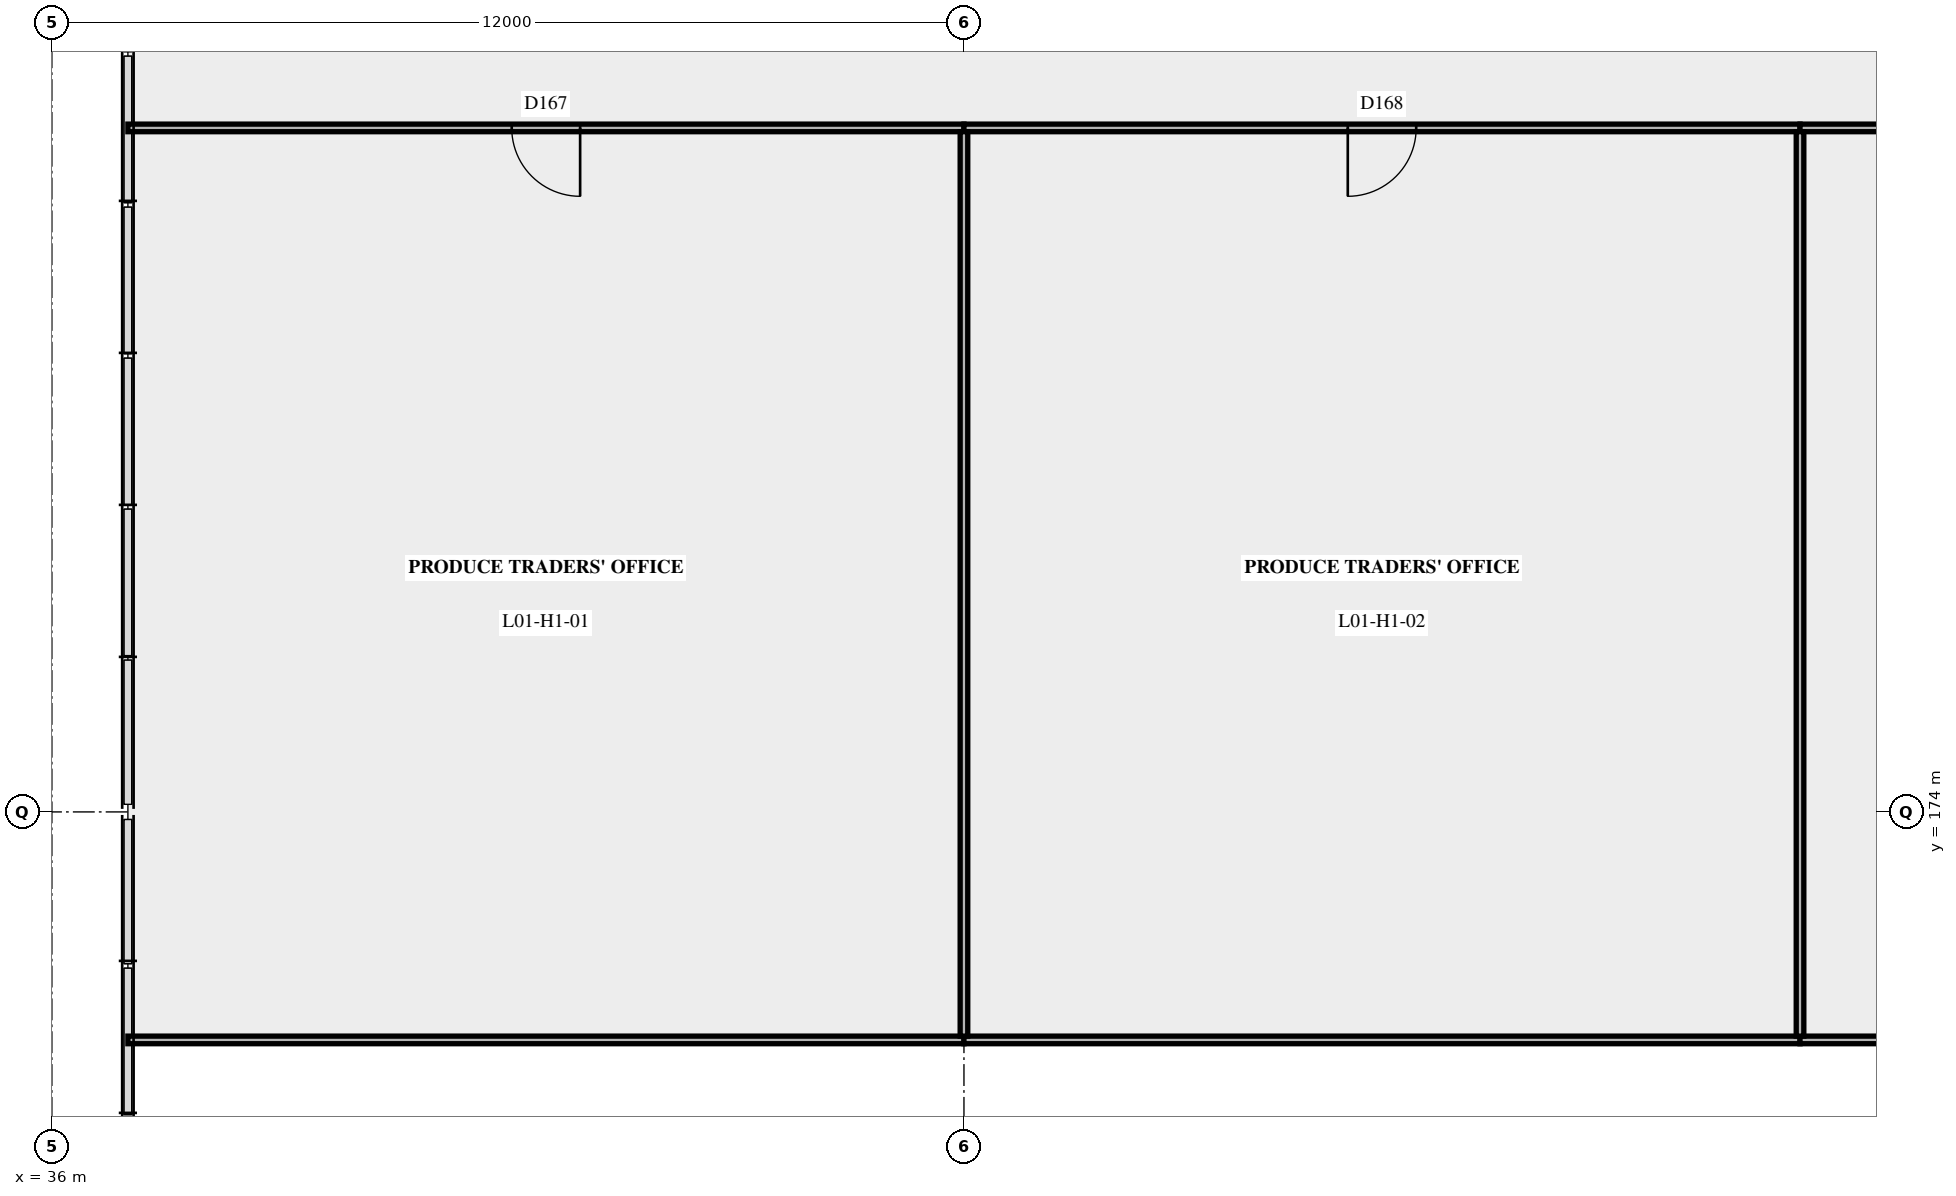
"""IFC4 building model, lengths in metres.
Left out: names, types, materials, properties, quantities, classifications, styles, units other than length and angle.
Written with IfcOpenShell. Run it as: python <this file> out.ifc"""

import sys

from ifc_helpers import new_model, si_unit, direction, frame, frame_2d, origin, place, context, subcontext, project, spatial, rectangle, extrude, element, fill, save


model = new_model("IFC4")
c1 = context("Model", 3, precision=1e-05, world=origin(), true_north=direction((0.0, 1.0)))
c2 = subcontext(c1, "Body", "Model", "MODEL_VIEW")
j1 = project(units=[si_unit("LENGTHUNIT", "METRE"), si_unit("PLANEANGLEUNIT", "RADIAN")], contexts=[c1])
p1 = place(None, origin())
s1 = spatial("IfcSite", under=j1, at=p1, CompositionType="ELEMENT")
p2 = place(p1, origin())
s2 = spatial("IfcBuilding", under=s1, at=p2, CompositionType="ELEMENT")
p3 = place(p2, frame((0.0, 0.0, 5.4)))
s3 = spatial("IfcBuildingStorey", under=s2, at=p3, CompositionType="ELEMENT", Elevation=5.4)
for number, where, z_axis, x_axis in (
    (1, (37.0, 171.0, 0.0), (0.0, 0.0, 1.0), (1.0, 0.0, 0.0)),
    (2, (48.0, 171.0, 0.0), (0.0, 0.0, 1.0), (1.0, 0.0, 0.0)),
    (3, (59.0, 171.0, 0.0), (0.0, 0.0, 1.0), (1.0, 0.0, 0.0)),
):
    element("IfcWall", number, at=place(p3, frame(where, z_axis=z_axis, x_axis=x_axis)), inside=s3, PredefinedType="PARTITIONING", context=c2, shape_type="SweptSolid", body=[
        extrude(rectangle(XDim=11.0, YDim=0.1, at=frame_2d((5.5, 0.0))), origin(), (0.0, 0.0, 1.0), 3.6),
    ])
p4 = place(p3, frame((37.0, 183.0, 0.0), z_axis=(0.0, 0.0, 1.0), x_axis=(1.0, 0.0, 0.0)))
e4 = element("IfcWall", 4, at=p4, inside=s3, PredefinedType="PARTITIONING", context=c2, shape_type="SweptSolid", body=[
    extrude(rectangle(XDim=11.0, YDim=0.1, at=frame_2d((5.5, 0.0))), origin(), (0.0, 0.0, 1.0), 3.6),
])
p5 = place(p4, frame((5.05, 0.0, 0.0)))
e5 = element("IfcOpeningElement", 5, at=p5, cuts=e4, PredefinedType="OPENING", context=c2, shape_type="SweptSolid", body=[
    extrude(rectangle(XDim=0.9, YDim=2.1, at=frame_2d((0.45, 1.05))), frame((0.0, 0.06, 0.0), z_axis=(0.0, -1.0, 0.0), x_axis=(1.0, 0.0, 0.0)), (0.0, 0.0, 1.0), 0.12),
])
p6 = place(p3, frame((48.0, 183.0, 0.0), z_axis=(0.0, 0.0, 1.0), x_axis=(1.0, 0.0, 0.0)))
e6 = element("IfcWall", 6, at=p6, inside=s3, PredefinedType="PARTITIONING", context=c2, shape_type="SweptSolid", body=[
    extrude(rectangle(XDim=11.0, YDim=0.1, at=frame_2d((5.5, 0.0))), origin(), (0.0, 0.0, 1.0), 3.6),
])
p7 = place(p6, frame((5.05, 0.0, 0.0)))
e7 = element("IfcOpeningElement", 7, at=p7, cuts=e6, PredefinedType="OPENING", context=c2, shape_type="SweptSolid", body=[
    extrude(rectangle(XDim=0.9, YDim=2.1, at=frame_2d((0.45, 1.05))), frame((0.0, 0.06, 0.0), z_axis=(0.0, -1.0, 0.0), x_axis=(1.0, 0.0, 0.0)), (0.0, 0.0, 1.0), 0.12),
])
p8 = place(p3, frame((59.0, 183.0, 0.0), z_axis=(0.0, 0.0, 1.0), x_axis=(1.0, 0.0, 0.0)))
e8 = element("IfcWall", 8, at=p8, inside=s3, PredefinedType="PARTITIONING", context=c2, shape_type="SweptSolid", body=[
    extrude(rectangle(XDim=11.0, YDim=0.1, at=frame_2d((5.5, 0.0))), origin(), (0.0, 0.0, 1.0), 3.6),
])
p9 = place(p8, frame((5.05, 0.0, 0.0)))
e9 = element("IfcOpeningElement", 9, at=p9, cuts=e8, PredefinedType="OPENING", context=c2, shape_type="SweptSolid", body=[
    extrude(rectangle(XDim=0.9, YDim=2.1, at=frame_2d((0.45, 1.05))), frame((0.0, 0.06, 0.0), z_axis=(0.0, -1.0, 0.0), x_axis=(1.0, 0.0, 0.0)), (0.0, 0.0, 1.0), 0.12),
])
for number, where, z_axis, x_axis in (
    (10, (48.0, 171.05, 0.0), (0.0, 0.0, 1.0), (0.0, 1.0, 0.0)),
    (11, (59.0, 171.05, 0.0), (0.0, 0.0, 1.0), (0.0, 1.0, 0.0)),
):
    element("IfcWall", number, at=place(p3, frame(where, z_axis=z_axis, x_axis=x_axis)), inside=s3, PredefinedType="PARTITIONING", context=c2, shape_type="SweptSolid", body=[
        extrude(rectangle(XDim=11.9, YDim=0.1, at=frame_2d((5.95, 0.0))), origin(), (0.0, 0.0, 1.0), 3.6),
    ])
p10 = place(p5, origin())
e12 = element("IfcDoor", 12, at=p10, inside=s3, OperationType="SINGLE_SWING_LEFT", PredefinedType="DOOR", context=c2, shape_type="SweptSolid", body=[
    extrude(rectangle(XDim=0.9, YDim=2.1, at=frame_2d((0.45, 1.05))), frame((0.0, 0.025, 0.0), z_axis=(0.0, -1.0, 0.0), x_axis=(1.0, 0.0, 0.0)), (0.0, 0.0, 1.0), 0.05),
])
fill(e5, e12)
p11 = place(p7, origin())
e13 = element("IfcDoor", 13, at=p11, inside=s3, OperationType="SINGLE_SWING_RIGHT", PredefinedType="DOOR", context=c2, shape_type="SweptSolid", body=[
    extrude(rectangle(XDim=0.9, YDim=2.1, at=frame_2d((0.45, 1.05))), frame((0.0, 0.025, 0.0), z_axis=(0.0, -1.0, 0.0), x_axis=(1.0, 0.0, 0.0)), (0.0, 0.0, 1.0), 0.05),
])
fill(e7, e13)
save(model, sys.argv[1])
